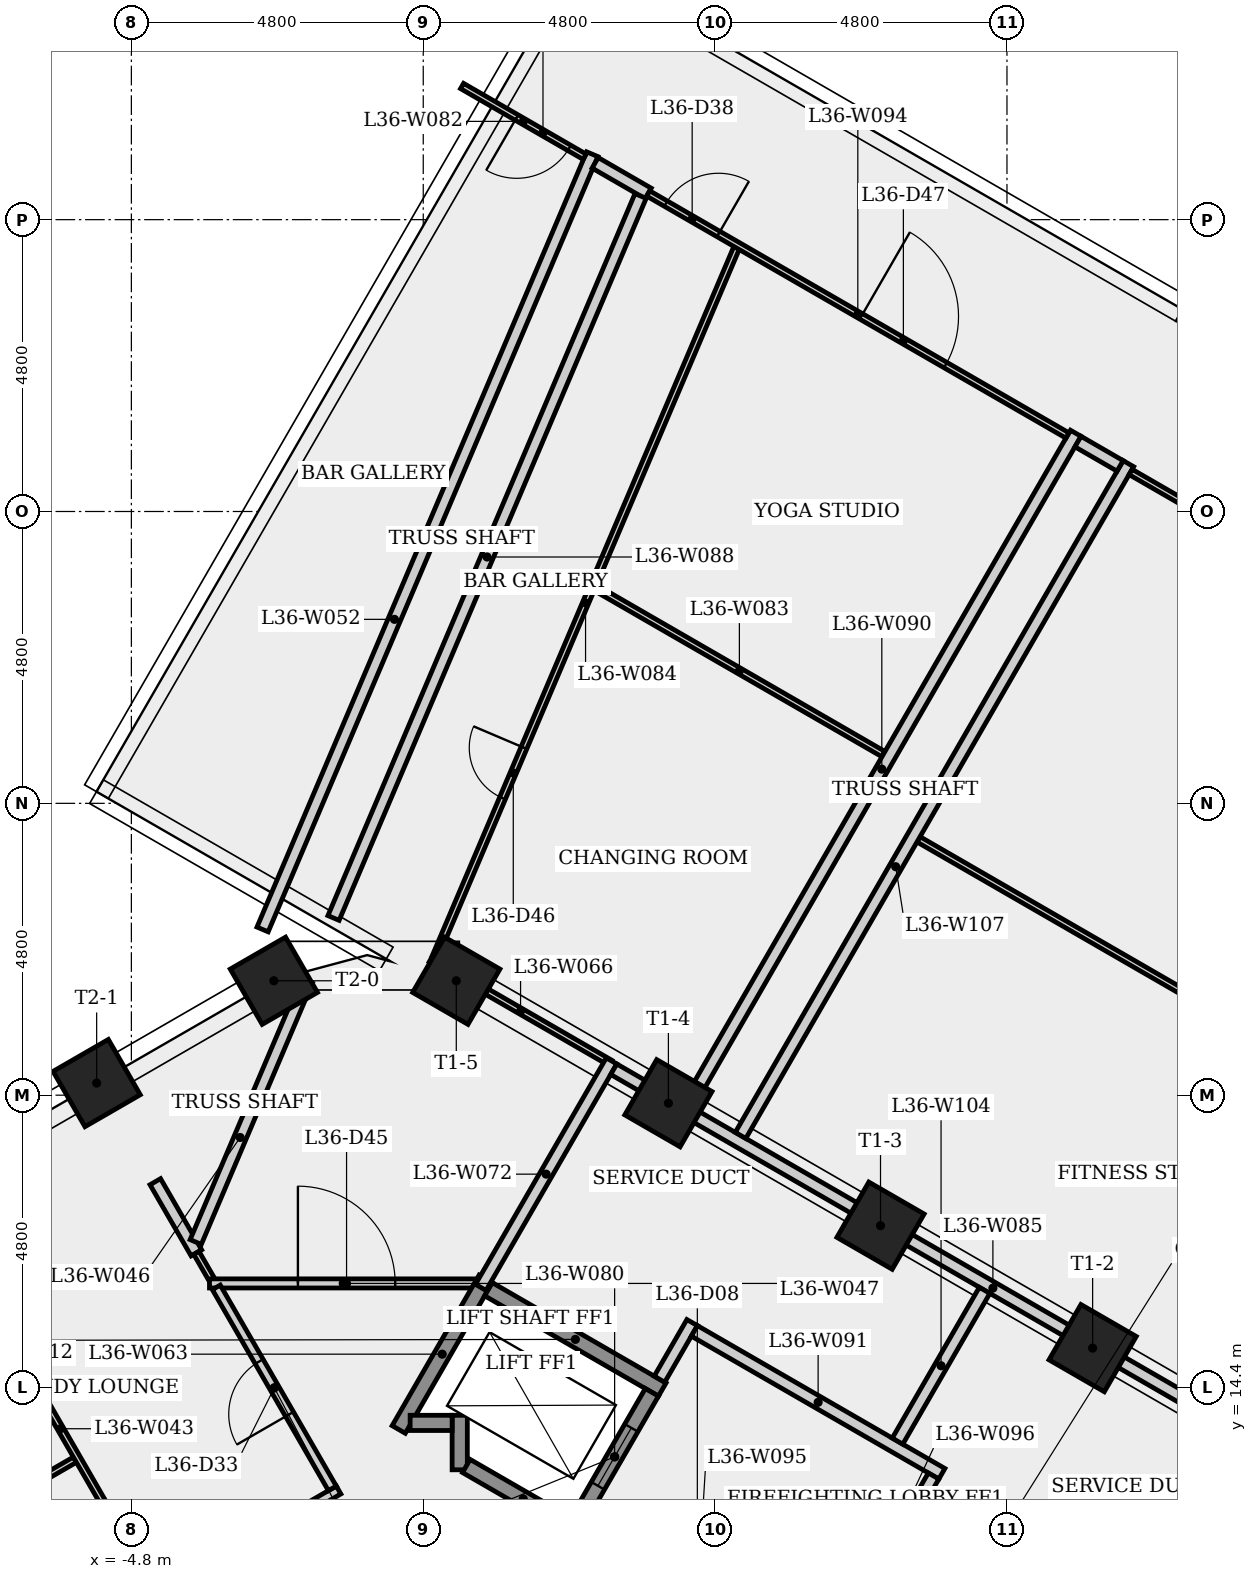
"""IFC4 building model, lengths in metres.
Left out: names, types, materials, properties, quantities, classifications, styles, units other than length and angle.
Written with IfcOpenShell. Run it as: python <this file> out.ifc"""

import sys

from ifc_helpers import new_model, si_unit, direction, frame, frame_2d, origin, origin_2d, place, context, subcontext, project, spatial, rectangle, extrude, element, fill, save


model = new_model("IFC4")
c1 = context("Model", 3, precision=1e-05, world=origin(), true_north=direction((0.0, 1.0)))
c2 = subcontext(c1, "Body", "Model", "MODEL_VIEW")
j1 = project(units=[si_unit("LENGTHUNIT", "METRE"), si_unit("PLANEANGLEUNIT", "RADIAN")], contexts=[c1])
p1 = place(None, origin())
s1 = spatial("IfcSite", under=j1, at=p1, CompositionType="ELEMENT")
p2 = place(p1, origin())
s2 = spatial("IfcBuilding", under=s1, at=p2, CompositionType="ELEMENT")
p3 = place(p2, frame((0.0, 0.0, 135.9)))
s3 = spatial("IfcBuildingStorey", under=s2, at=p3, CompositionType="ELEMENT", Elevation=135.9)
for number, where, z_axis, x_axis in (
    (1, (11.009, 15.04, 0.0), (0.0, 0.0, 1.0), (0.5, 0.866, 0.0)),
    (2, (7.52, 17.054, 0.0), (0.0, 0.0, 1.0), (0.5, 0.866, 0.0)),
    (3, (4.032, 19.068, 0.0), (0.0, 0.0, 1.0), (0.5, 0.866, 0.0)),
    (4, (0.543, 21.082, 0.0), (0.0, 0.0, 1.0), (0.5, 0.866, 0.0)),
    (5, (-2.457, 21.082, 0.0), (0.0, 0.0, 1.0), (-0.5, 0.866, 0.0)),
    (6, (-5.371, 19.399, 0.0), (0.0, 0.0, 1.0), (-0.5, 0.866, 0.0)),
):
    element("IfcColumn", number, at=place(p3, frame(where, z_axis=z_axis, x_axis=x_axis)), inside=s3, PredefinedType="COLUMN", context=c2, shape_type="SweptSolid", body=[
        extrude(rectangle(XDim=1.05, YDim=1.05, at=origin_2d()), origin(), (0.0, 0.0, 1.0), 4.0),
    ])
p4 = place(p3, frame((-10.178, 7.634, 0.0), z_axis=(0.0, 0.0, 1.0), x_axis=(0.866024876865, 0.500000912651, 0.0)))
e7 = element("IfcWall", 7, at=p4, inside=s3, PredefinedType="PARTITIONING", context=c2, shape_type="SweptSolid", body=[
    extrude(rectangle(XDim=10.145, YDim=0.15, at=frame_2d((5.072, 0.0))), origin(), (0.0, 0.0, 1.0), 3.6),
])
p5 = place(p4, frame((3.707, 0.0, 0.0)))
e8 = element("IfcOpeningElement", 8, at=p5, cuts=e7, PredefinedType="OPENING", context=c2, shape_type="SweptSolid", body=[
    extrude(rectangle(XDim=0.9, YDim=2.1, at=frame_2d((0.45, 1.05))), frame((0.0, 0.085, 0.0), z_axis=(0.0, -1.0, 0.0), x_axis=(1.0, 0.0, 0.0)), (0.0, 0.0, 1.0), 0.17),
])
p6 = place(p3, frame((-5.729, 13.205, 0.0), z_axis=(0.0, 0.0, 1.0), x_axis=(-0.866021059532, -0.50000752439, 0.0)))
e9 = element("IfcWall", 9, at=p6, inside=s3, PredefinedType="PARTITIONING", context=c2, shape_type="SweptSolid", body=[
    extrude(rectangle(XDim=1.582, YDim=0.1, at=frame_2d((0.791, 0.0))), origin(), (0.0, 0.0, 1.0), 3.6),
])
p7 = place(p3, frame((-4.406, 17.777, 0.0), z_axis=(0.0, 0.0, 1.0), x_axis=(0.499868360126, -0.866101392762, 0.0)))
e10 = element("IfcWall", 10, at=p7, inside=s3, PredefinedType="PLUMBINGWALL", context=c2, shape_type="SweptSolid", body=[
    extrude(rectangle(XDim=1.352, YDim=0.2, at=frame_2d((0.676, 0.0))), origin(), (0.0, 0.0, 1.0), 3.6),
])
p8 = place(p3, frame((-4.423, 11.043, 0.0), z_axis=(0.0, 0.0, 1.0), x_axis=(-0.499983743644, 0.866034789193, 0.0)))
e11 = element("IfcWall", 11, at=p8, inside=s3, PredefinedType="PARTITIONING", context=c2, shape_type="SweptSolid", body=[
    extrude(rectangle(XDim=7.711, YDim=0.1, at=frame_2d((3.855, 0.0))), origin(), (0.0, 0.0, 1.0), 3.6),
])
p9 = place(p3, frame((-3.731, 16.606, 0.0), z_axis=(0.0, 0.0, 1.0), x_axis=(0.499931517724, -0.866064938435, 0.0)))
e12 = element("IfcWall", 12, at=p9, inside=s3, PredefinedType="PARTITIONING", context=c2, shape_type="SweptSolid", body=[
    extrude(rectangle(XDim=0.505, YDim=0.1, at=frame_2d((0.253, 0.0))), origin(), (0.0, 0.0, 1.0), 3.6),
])
p10 = place(p3, frame((-3.742, 16.785, 0.0), z_axis=(0.0, 0.0, 1.0), x_axis=(0.391305578828, 0.920260802152, 0.0)))
e13 = element("IfcWall", 13, at=p10, inside=s3, PredefinedType="PLUMBINGWALL", context=c2, shape_type="SweptSolid", body=[
    extrude(rectangle(XDim=4.67, YDim=0.2, at=frame_2d((2.335, 0.0))), origin(), (0.0, 0.0, 1.0), 3.6),
])
p11 = place(p3, frame((-3.516, 16.104, 0.0), z_axis=(0.0, 0.0, 1.0), x_axis=(1.0, 0.0, 0.0)))
e14 = element("IfcWall", 14, at=p11, inside=s3, PredefinedType="PARTITIONING", context=c2, shape_type="SweptSolid", body=[
    extrude(rectangle(XDim=4.399, YDim=0.15, at=frame_2d((2.2, 0.0))), origin(), (0.0, 0.0, 1.0), 3.6),
])
p12 = place(p11, frame((1.455, 0.0, 0.0)))
e15 = element("IfcOpeningElement", 15, at=p12, cuts=e14, PredefinedType="OPENING", context=c2, shape_type="SweptSolid", body=[
    extrude(rectangle(XDim=1.6, YDim=2.1, at=frame_2d((0.8, 1.05))), frame((0.0, 0.085, 0.0), z_axis=(0.0, -1.0, 0.0), x_axis=(1.0, 0.0, 0.0)), (0.0, 0.0, 1.0), 0.17),
])
p13 = place(p3, frame((-2.642, 21.926, 0.0), z_axis=(0.0, 0.0, 1.0), x_axis=(0.391327561496, 0.920251454557, 0.0)))
e16 = element("IfcWall", 16, at=p13, inside=s3, PredefinedType="PLUMBINGWALL", context=c2, shape_type="SweptSolid", body=[
    extrude(rectangle(XDim=13.856, YDim=0.2, at=frame_2d((6.928, 0.0))), origin(), (0.0, 0.0, 1.0), 3.6),
])
p14 = place(p3, frame((-1.495, 12.734, 0.0), z_axis=(0.0, 0.0, 1.0), x_axis=(-0.499991942392, 0.866030055796, 0.0)))
e17 = element("IfcWall", 17, at=p14, inside=s3, PredefinedType="PARTITIONING", context=c2, shape_type="SweptSolid", body=[
    extrude(rectangle(XDim=3.816, YDim=0.15, at=frame_2d((1.908, 0.0))), origin(), (0.0, 0.0, 1.0), 3.6),
])
p15 = place(p14, frame((1.408, 0.0, 0.0)))
e18 = element("IfcOpeningElement", 18, at=p15, cuts=e17, PredefinedType="OPENING", context=c2, shape_type="SweptSolid", body=[
    extrude(rectangle(XDim=1.0, YDim=2.1, at=frame_2d((0.5, 1.05))), frame((0.0, 0.085, 0.0), z_axis=(0.0, -1.0, 0.0), x_axis=(1.0, 0.0, 0.0)), (0.0, 0.0, 1.0), 0.17),
])
p16 = place(p3, frame((-0.403, 13.702, 0.0), z_axis=(0.0, 0.0, 1.0), x_axis=(0.499976111731, 0.866039195244, 0.0)))
e19 = element("IfcWall", 19, at=p16, inside=s3, PredefinedType="SHEAR", context=c2, shape_type="SweptSolid", body=[
    extrude(rectangle(XDim=2.861, YDim=0.25, at=frame_2d((1.43, 0.0))), origin(), (0.0, 0.0, 1.0), 3.6),
])
p17 = place(p3, frame((0.124, 21.436, 0.0), z_axis=(0.0, 0.0, 1.0), x_axis=(0.866036589769, -0.499980624807, 0.0)))
e20 = element("IfcWall", 20, at=p17, inside=s3, PredefinedType="PARTITIONING", context=c2, shape_type="SweptSolid", body=[
    extrude(rectangle(XDim=3.411, YDim=0.1, at=frame_2d((1.706, 0.0))), origin(), (0.0, 0.0, 1.0), 2.725),
])
p18 = place(p3, frame((0.6, 13.039, 0.0), z_axis=(0.0, 0.0, 1.0), x_axis=(0.0, 1.0, 0.0)))
e21 = element("IfcWall", 21, at=p18, inside=s3, PredefinedType="SHEAR", context=c2, shape_type="SweptSolid", body=[
    extrude(rectangle(XDim=0.896, YDim=0.25, at=frame_2d((0.448, 0.0))), origin(), (0.0, 0.0, 1.0), 3.6),
])
p19 = place(p3, frame((0.475, 13.81, 0.0), z_axis=(0.0, 0.0, 1.0), x_axis=(-1.0, 0.0, 0.0)))
e22 = element("IfcWall", 22, at=p19, inside=s3, PredefinedType="SHEAR", context=c2, shape_type="SweptSolid", body=[
    extrude(rectangle(XDim=0.691, YDim=0.25, at=frame_2d((0.345, 0.0))), origin(), (0.0, 0.0, 1.0), 4.0),
])
p20 = place(p3, frame((1.073, 16.008, 0.0), z_axis=(0.0, 0.0, 1.0), x_axis=(0.866040211805, -0.499974350878, 0.0)))
e23 = element("IfcWall", 23, at=p20, inside=s3, PredefinedType="SHEAR", context=c2, shape_type="SweptSolid", body=[
    extrude(rectangle(XDim=3.3, YDim=0.25, at=frame_2d((1.65, 0.0))), origin(), (0.0, 0.0, 1.0), 3.6),
])
p21 = place(p3, frame((0.946, 16.039, 0.0), z_axis=(0.0, 0.0, 1.0), x_axis=(0.50004020135, 0.86600219228, 0.0)))
e24 = element("IfcWall", 24, at=p21, inside=s3, PredefinedType="PLUMBINGWALL", context=c2, shape_type="SweptSolid", body=[
    extrude(rectangle(XDim=4.301, YDim=0.2, at=frame_2d((2.15, 0.0))), origin(), (0.0, 0.0, 1.0), 3.6),
])
p22 = place(p3, frame((2.581, 12.02, 0.0), z_axis=(0.0, 0.0, 1.0), x_axis=(-0.86603892542, 0.499976579108, 0.0)))
e25 = element("IfcWall", 25, at=p22, inside=s3, PredefinedType="SHEAR", context=c2, shape_type="SweptSolid", body=[
    extrude(rectangle(XDim=2.162, YDim=0.25, at=frame_2d((1.081, 0.0))), origin(), (0.0, 0.0, 1.0), 3.6),
])
p23 = place(p3, frame((2.535, 12.191, 0.0), z_axis=(0.0, 0.0, 1.0), x_axis=(0.500061746146, 0.865989751695, 0.0)))
e26 = element("IfcWall", 26, at=p23, inside=s3, PredefinedType="SHEAR", context=c2, shape_type="SweptSolid", body=[
    extrude(rectangle(XDim=2.45, YDim=0.25, at=frame_2d((1.225, 0.0))), origin(), (0.0, 0.0, 1.0), 4.0),
])
p24 = place(p23, frame((0.675, 0.0, 0.0)))
e27 = element("IfcOpeningElement", 27, at=p24, cuts=e26, PredefinedType="OPENING", context=c2, shape_type="SweptSolid", body=[
    extrude(rectangle(XDim=1.1, YDim=2.1, at=frame_2d((0.55, 1.05))), frame((0.0, 0.135, 0.0), z_axis=(0.0, -1.0, 0.0), x_axis=(1.0, 0.0, 0.0)), (0.0, 0.0, 1.0), 0.27),
])
p25 = place(p3, frame((2.827, 34.534, 0.0), z_axis=(0.0, 0.0, 1.0), x_axis=(0.866012023309, -0.500023174947, 0.0)))
e28 = element("IfcWall", 28, at=p25, inside=s3, PredefinedType="PLUMBINGWALL", context=c2, shape_type="SweptSolid", body=[
    extrude(rectangle(XDim=1.007, YDim=0.2, at=frame_2d((0.504, 0.0))), origin(), (0.0, 0.0, 1.0), 3.6),
])
p26 = place(p3, frame((2.654, 34.635, 0.0), z_axis=(0.0, 0.0, 1.0), x_axis=(-0.866052829878, 0.499952493604, 0.0)))
e29 = element("IfcWall", 29, at=p26, inside=s3, PredefinedType="PARTITIONING", context=c2, shape_type="SweptSolid", body=[
    extrude(rectangle(XDim=2.327, YDim=0.1, at=frame_2d((1.164, 0.0))), origin(), (0.0, 0.0, 1.0), 3.6),
])
p27 = place(p26, frame((0.291, 0.0, 0.0)))
e30 = element("IfcOpeningElement", 30, at=p27, cuts=e29, PredefinedType="OPENING", context=c2, shape_type="SweptSolid", body=[
    extrude(rectangle(XDim=1.0, YDim=2.1, at=frame_2d((0.5, 1.05))), frame((0.0, 0.06, 0.0), z_axis=(0.0, -1.0, 0.0), x_axis=(1.0, 0.0, 0.0)), (0.0, 0.0, 1.0), 0.12),
])
p28 = place(p3, frame((2.83, 27.546, 0.0), z_axis=(0.0, 0.0, 1.0), x_axis=(0.866035515232, -0.49998248605, 0.0)))
e31 = element("IfcWall", 31, at=p28, inside=s3, PredefinedType="PARTITIONING", context=c2, shape_type="SweptSolid", body=[
    extrude(rectangle(XDim=5.472, YDim=0.1, at=frame_2d((2.736, 0.0))), origin(), (0.0, 0.0, 1.0), 3.6),
])
p29 = place(p3, frame((0.187, 21.457, 0.0), z_axis=(0.0, 0.0, 1.0), x_axis=(0.391326404729, 0.920251946459, 0.0)))
e32 = element("IfcWall", 32, at=p29, inside=s3, PredefinedType="PARTITIONING", context=c2, shape_type="SweptSolid", body=[
    extrude(rectangle(XDim=12.69, YDim=0.1, at=frame_2d((6.345, 0.0))), origin(), (0.0, 0.0, 1.0), 3.6),
])
p30 = place(p29, frame((2.857, 0.0, 0.0)))
e33 = element("IfcOpeningElement", 33, at=p30, cuts=e32, PredefinedType="OPENING", context=c2, shape_type="SweptSolid", body=[
    extrude(rectangle(XDim=0.9, YDim=2.1, at=frame_2d((0.45, 1.05))), frame((0.0, 0.06, 0.0), z_axis=(0.0, -1.0, 0.0), x_axis=(1.0, 0.0, 0.0)), (0.0, 0.0, 1.0), 0.12),
])
p31 = place(p3, frame((3.133, 19.627, 0.0), z_axis=(0.0, 0.0, 1.0), x_axis=(0.866025783705, -0.499999341958, 0.0)))
e34 = element("IfcWall", 34, at=p31, inside=s3, PredefinedType="PLUMBINGWALL", context=c2, shape_type="SweptSolid", body=[
    extrude(rectangle(XDim=14.4, YDim=0.2, at=frame_2d((7.2, 0.0))), origin(), (0.0, 0.0, 1.0), 2.725),
])
p32 = place(p3, frame((3.574, 33.989, 0.0), z_axis=(0.0, 0.0, 1.0), x_axis=(-0.391321327566, -0.920254105447, 0.0)))
e35 = element("IfcWall", 35, at=p32, inside=s3, PredefinedType="PLUMBINGWALL", context=c2, shape_type="SweptSolid", body=[
    extrude(rectangle(XDim=12.903, YDim=0.2, at=frame_2d((6.452, 0.0))), origin(), (0.0, 0.0, 1.0), 3.6),
])
p33 = place(p3, frame((3.885, 14.529, 0.0), z_axis=(0.0, 0.0, 1.0), x_axis=(0.499997628298, 0.866026773083, 0.0)))
e36 = element("IfcWall", 36, at=p33, inside=s3, PredefinedType="PLUMBINGWALL", context=c2, shape_type="SweptSolid", body=[
    extrude(rectangle(XDim=1.075, YDim=0.2, at=frame_2d((0.538, 0.0))), origin(), (0.0, 0.0, 1.0), 3.6),
])
p34 = place(p3, frame((4.352, 19.038, 0.0), z_axis=(0.0, 0.0, 1.0), x_axis=(0.500008481224, 0.866020507092, 0.0)))
e37 = element("IfcWall", 37, at=p34, inside=s3, PredefinedType="PLUMBINGWALL", context=c2, shape_type="SweptSolid", body=[
    extrude(rectangle(XDim=12.758, YDim=0.2, at=frame_2d((6.379, 0.0))), origin(), (0.0, 0.0, 1.0), 3.6),
])
p35 = place(p3, frame((4.459, 15.323, 0.0), z_axis=(0.0, 0.0, 1.0), x_axis=(0.866016039709, -0.500016218704, 0.0)))
e38 = element("IfcWall", 38, at=p35, inside=s3, PredefinedType="PLUMBINGWALL", context=c2, shape_type="SweptSolid", body=[
    extrude(rectangle(XDim=4.7, YDim=0.2, at=frame_2d((2.35, 0.0))), origin(), (0.0, 0.0, 1.0), 3.6),
])
p36 = place(p3, frame((3.7, 34.031, 0.0), z_axis=(0.0, 0.0, 1.0), x_axis=(0.866024725942, -0.500001174055, 0.0)))
e39 = element("IfcWall", 39, at=p36, inside=s3, PredefinedType="PARTITIONING", context=c2, shape_type="SweptSolid", body=[
    extrude(rectangle(XDim=7.961, YDim=0.1, at=frame_2d((3.981, 0.0))), origin(), (0.0, 0.0, 1.0), 3.6),
])
p37 = place(p36, frame((0.335, 0.0, 0.0)))
e40 = element("IfcOpeningElement", 40, at=p37, cuts=e39, PredefinedType="OPENING", context=c2, shape_type="SweptSolid", body=[
    extrude(rectangle(XDim=1.0, YDim=2.1, at=frame_2d((0.5, 1.05))), frame((0.0, 0.06, 0.0), z_axis=(0.0, -1.0, 0.0), x_axis=(1.0, 0.0, 0.0)), (0.0, 0.0, 1.0), 0.12),
])
p38 = place(p36, frame((4.046, 0.0, 0.0)))
e41 = element("IfcOpeningElement", 41, at=p38, cuts=e39, PredefinedType="OPENING", context=c2, shape_type="SweptSolid", body=[
    extrude(rectangle(XDim=1.6, YDim=2.1, at=frame_2d((0.8, 1.05))), frame((0.0, 0.06, 0.0), z_axis=(0.0, -1.0, 0.0), x_axis=(1.0, 0.0, 0.0)), (0.0, 0.0, 1.0), 0.12),
])
p39 = place(p3, frame((7.8, 13.51, 0.0), z_axis=(0.0, 0.0, 1.0), x_axis=(0.499980730498, 0.866036528751, 0.0)))
e42 = element("IfcWall", 42, at=p39, inside=s3, PredefinedType="PLUMBINGWALL", context=c2, shape_type="SweptSolid", body=[
    extrude(rectangle(XDim=2.864, YDim=0.2, at=frame_2d((1.432, 0.0))), origin(), (0.0, 0.0, 1.0), 3.6),
])
p40 = place(p3, frame((8.145, 23.408, 0.0), z_axis=(0.0, 0.0, 1.0), x_axis=(0.866032748968, -0.499987277554, 0.0)))
e43 = element("IfcWall", 43, at=p40, inside=s3, PredefinedType="PARTITIONING", context=c2, shape_type="SweptSolid", body=[
    extrude(rectangle(XDim=12.05, YDim=0.1, at=frame_2d((6.025, 0.0))), origin(), (0.0, 0.0, 1.0), 3.6),
])
p41 = place(p3, frame((5.219, 18.538, 0.0), z_axis=(0.0, 0.0, 1.0), x_axis=(0.499994128518, 0.86602879366, 0.0)))
e44 = element("IfcWall", 44, at=p41, inside=s3, PredefinedType="PLUMBINGWALL", context=c2, shape_type="SweptSolid", body=[
    extrude(rectangle(XDim=12.758, YDim=0.2, at=frame_2d((6.379, 0.0))), origin(), (0.0, 0.0, 1.0), 3.6),
])
p42 = place(p3, frame((8.393, 12.937, 0.0), z_axis=(0.0, 0.0, 1.0), x_axis=(-0.500065409566, -0.86598763626, 0.0)))
e45 = element("IfcWall", 45, at=p42, inside=s3, PredefinedType="PLUMBINGWALL", context=c2, shape_type="SweptSolid", body=[
    extrude(rectangle(XDim=0.575, YDim=0.2, at=frame_2d((0.288, 0.0))), origin(), (0.0, 0.0, 1.0), 3.6),
])
p43 = place(p3, frame((10.768, 29.95, 0.0), z_axis=(0.0, 0.0, 1.0), x_axis=(0.865961984968, -0.500109828528, 0.0)))
e46 = element("IfcWall", 46, at=p43, inside=s3, PredefinedType="PLUMBINGWALL", context=c2, shape_type="SweptSolid", body=[
    extrude(rectangle(XDim=0.8, YDim=0.2, at=frame_2d((0.4, 0.0))), origin(), (0.0, 0.0, 1.0), 3.6),
])
p44 = place(p3, frame((11.634, 29.45, 0.0), z_axis=(0.0, 0.0, 1.0), x_axis=(0.866025616189, -0.499999632104, 0.0)))
e47 = element("IfcWall", 47, at=p44, inside=s3, PredefinedType="PARTITIONING", context=c2, shape_type="SweptSolid", body=[
    extrude(rectangle(XDim=13.8, YDim=0.1, at=frame_2d((6.9, 0.0))), origin(), (0.0, 0.0, 1.0), 3.6),
])
p45 = place(p44, frame((5.235, 0.0, 0.0)))
e48 = element("IfcOpeningElement", 48, at=p45, cuts=e47, PredefinedType="OPENING", context=c2, shape_type="SweptSolid", body=[
    extrude(rectangle(XDim=1.6, YDim=2.1, at=frame_2d((0.8, 1.05))), frame((0.0, 0.06, 0.0), z_axis=(0.0, -1.0, 0.0), x_axis=(1.0, 0.0, 0.0)), (0.0, 0.0, 1.0), 0.12),
])
p46 = place(p24, origin())
e49 = element("IfcDoor", 49, at=p46, inside=s3, OperationType="SLIDING_TO_LEFT", PredefinedType="DOOR", context=c2, shape_type="SweptSolid", body=[
    extrude(rectangle(XDim=1.1, YDim=2.1, at=frame_2d((0.55, 1.05))), frame((0.0, 0.025, 0.0), z_axis=(0.0, -1.0, 0.0), x_axis=(1.0, 0.0, 0.0)), (0.0, 0.0, 1.0), 0.05),
])
fill(e27, e49)
p47 = place(p15, origin())
e50 = element("IfcDoor", 50, at=p47, inside=s3, OperationType="SINGLE_SWING_LEFT", PredefinedType="DOOR", context=c2, shape_type="SweptSolid", body=[
    extrude(rectangle(XDim=1.0, YDim=2.1, at=frame_2d((0.5, 1.05))), frame((0.0, 0.025, 0.0), z_axis=(0.0, -1.0, 0.0), x_axis=(1.0, 0.0, 0.0)), (0.0, 0.0, 1.0), 0.05),
])
fill(e18, e50)
p48 = place(p37, origin())
e51 = element("IfcDoor", 51, at=p48, inside=s3, OperationType="SINGLE_SWING_RIGHT", PredefinedType="DOOR", context=c2, shape_type="SweptSolid", body=[
    extrude(rectangle(XDim=1.0, YDim=2.1, at=frame_2d((0.5, 1.05))), frame((0.0, 0.025, 0.0), z_axis=(0.0, -1.0, 0.0), x_axis=(1.0, 0.0, 0.0)), (0.0, 0.0, 1.0), 0.05),
])
fill(e40, e51)
p49 = place(p12, origin())
e52 = element("IfcDoor", 52, at=p49, inside=s3, OperationType="SINGLE_SWING_LEFT", PredefinedType="DOOR", context=c2, shape_type="SweptSolid", body=[
    extrude(rectangle(XDim=1.6, YDim=2.1, at=frame_2d((0.8, 1.05))), frame((0.0, 0.025, 0.0), z_axis=(0.0, -1.0, 0.0), x_axis=(1.0, 0.0, 0.0)), (0.0, 0.0, 1.0), 0.05),
])
fill(e15, e52)
p50 = place(p30, origin())
e53 = element("IfcDoor", 53, at=p50, inside=s3, OperationType="SINGLE_SWING_RIGHT", PredefinedType="DOOR", context=c2, shape_type="SweptSolid", body=[
    extrude(rectangle(XDim=0.9, YDim=2.1, at=frame_2d((0.45, 1.05))), frame((0.0, 0.025, 0.0), z_axis=(0.0, -1.0, 0.0), x_axis=(1.0, 0.0, 0.0)), (0.0, 0.0, 1.0), 0.05),
])
fill(e33, e53)
p51 = place(p38, origin())
e54 = element("IfcDoor", 54, at=p51, inside=s3, OperationType="SINGLE_SWING_LEFT", PredefinedType="DOOR", context=c2, shape_type="SweptSolid", body=[
    extrude(rectangle(XDim=1.6, YDim=2.1, at=frame_2d((0.8, 1.05))), frame((0.0, 0.025, 0.0), z_axis=(0.0, -1.0, 0.0), x_axis=(1.0, 0.0, 0.0)), (0.0, 0.0, 1.0), 0.05),
])
fill(e41, e54)
p52 = place(p27, origin())
e55 = element("IfcDoor", 55, at=p52, inside=s3, OperationType="SINGLE_SWING_RIGHT", PredefinedType="DOOR", context=c2, shape_type="SweptSolid", body=[
    extrude(rectangle(XDim=1.0, YDim=2.1, at=frame_2d((0.5, 1.05))), frame((0.0, 0.025, 0.0), z_axis=(0.0, -1.0, 0.0), x_axis=(1.0, 0.0, 0.0)), (0.0, 0.0, 1.0), 0.05),
])
fill(e30, e55)
save(model, sys.argv[1])
